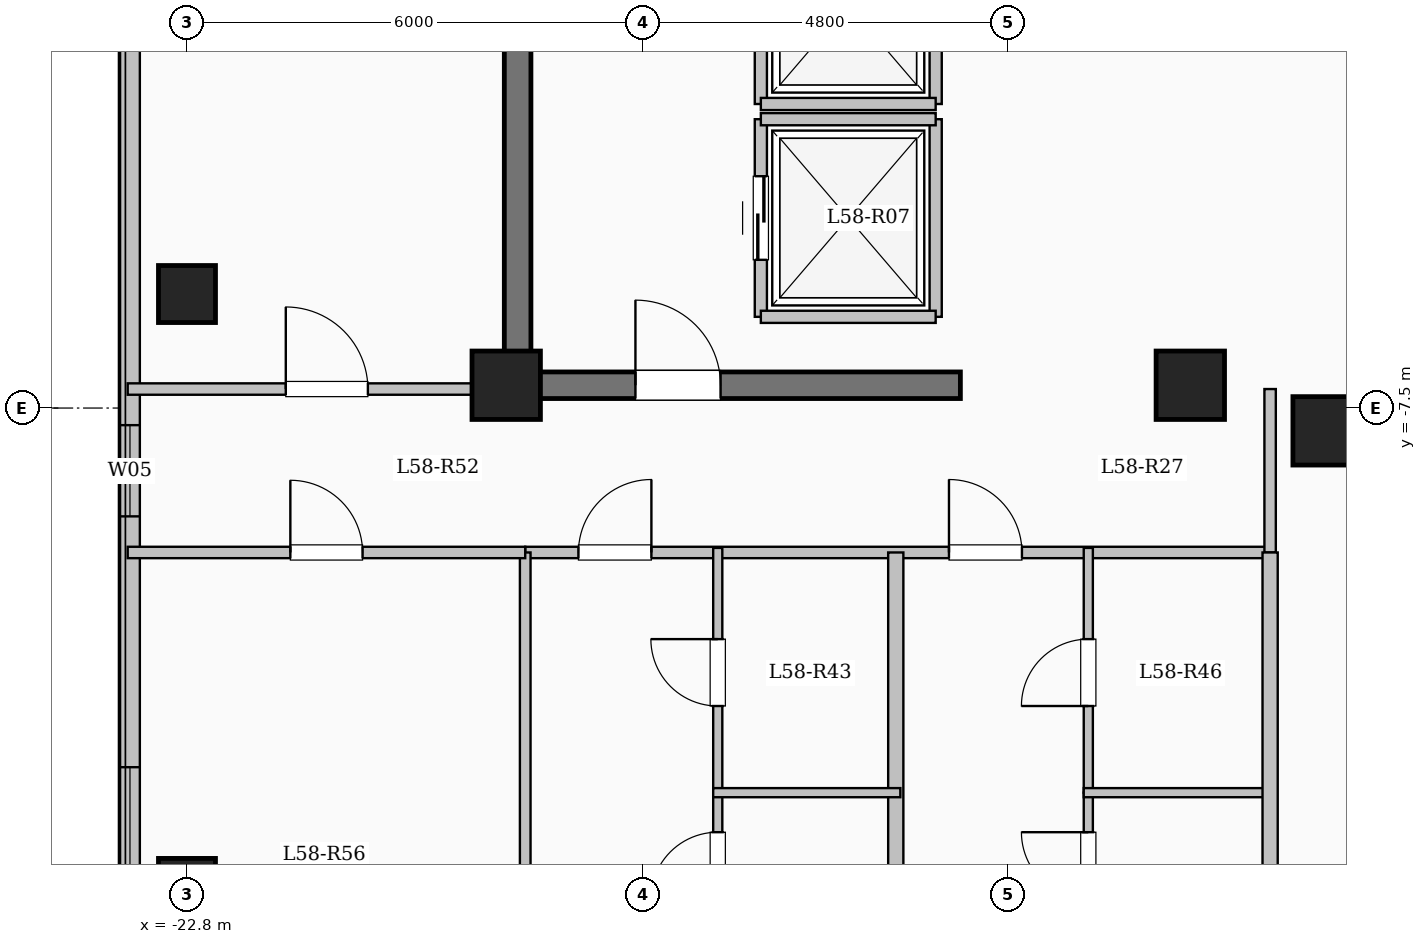
"""IFC4 building model, lengths in metres.
Left out: names, types, materials, properties, quantities, classifications, styles, units other than length and angle.
Written with IfcOpenShell. Run it as: python <this file> out.ifc"""

import sys

from ifc_helpers import new_model, si_unit, direction, frame, frame_2d, origin, origin_2d, place, context, subcontext, project, spatial, rectangle, extrude, element, fill, save


model = new_model("IFC4")
c1 = context("Model", 3, precision=1e-05, world=origin(), true_north=direction((0.0, 1.0)))
c2 = subcontext(c1, "Body", "Model", "MODEL_VIEW")
j1 = project(units=[si_unit("LENGTHUNIT", "METRE"), si_unit("PLANEANGLEUNIT", "RADIAN")], contexts=[c1])
p1 = place(None, origin())
s1 = spatial("IfcSite", under=j1, at=p1, CompositionType="ELEMENT")
p2 = place(p1, origin())
s2 = spatial("IfcBuilding", under=s1, at=p2, CompositionType="ELEMENT")
p3 = place(p2, frame((0.0, 0.0, 213.7)))
s3 = spatial("IfcBuildingStorey", under=s2, at=p3, CompositionType="ELEMENT", Elevation=213.7)
for number, where, z_axis, x_axis in (
    (1, (-7.8, -7.8, 0.0), (0.0, 0.0, 1.0), (1.0, 0.0, 0.0)),
    (2, (-9.6, -7.2, 0.0), (0.0, 0.0, 1.0), (1.0, 0.0, 0.0)),
    (3, (-18.6, -7.2, 0.0), (0.0, 0.0, 1.0), (1.0, 0.0, 0.0)),
):
    element("IfcColumn", number, at=place(p3, frame(where, z_axis=z_axis, x_axis=x_axis)), inside=s3, PredefinedType="COLUMN", context=c2, shape_type="SweptSolid", body=[
        extrude(rectangle(XDim=0.9, YDim=0.9, at=origin_2d()), origin(), (0.0, 0.0, 1.0), 3.35),
    ])
for number, where, z_axis, x_axis in (
    (4, (-22.8, -13.8, 0.0), (0.0, 0.0, 1.0), (1.0, 0.0, 0.0)),
    (5, (-22.8, -6.0, 0.0), (0.0, 0.0, 1.0), (1.0, 0.0, 0.0)),
):
    element("IfcColumn", number, at=place(p3, frame(where, z_axis=z_axis, x_axis=x_axis)), inside=s3, PredefinedType="COLUMN", context=c2, shape_type="SweptSolid", body=[
        extrude(rectangle(XDim=0.75, YDim=0.75, at=origin_2d()), origin(), (0.0, 0.0, 1.0), 3.35),
    ])
p4 = place(p3, frame((-23.55, -17.25, 0.0), z_axis=(0.0, 0.0, 1.0), x_axis=(0.0, 1.0, 0.0)))
e6 = element("IfcWall", 6, at=p4, inside=s3, PredefinedType="SOLIDWALL", context=c2, shape_type="SweptSolid", body=[
    extrude(rectangle(XDim=34.5, YDim=0.26, at=frame_2d((17.25, 0.0))), origin(), (0.0, 0.0, 1.0), 3.1),
])
p5 = place(p4, frame((2.825, 0.0, 0.9)))
e7 = element("IfcOpeningElement", 7, at=p5, cuts=e6, PredefinedType="OPENING", context=c2, shape_type="SweptSolid", body=[
    extrude(rectangle(XDim=2.2, YDim=1.75, at=frame_2d((1.1, 0.875))), frame((0.0, 0.14, 0.0), z_axis=(0.0, -1.0, 0.0), x_axis=(1.0, 0.0, 0.0)), (0.0, 0.0, 1.0), 0.28),
])
p6 = place(p4, frame((8.325, 0.0, 0.95)))
e8 = element("IfcOpeningElement", 8, at=p6, cuts=e6, PredefinedType="OPENING", context=c2, shape_type="SweptSolid", body=[
    extrude(rectangle(XDim=1.2, YDim=1.5, at=frame_2d((0.6, 0.75))), frame((0.0, 0.14, 0.0), z_axis=(0.0, -1.0, 0.0), x_axis=(1.0, 0.0, 0.0)), (0.0, 0.0, 1.0), 0.28),
])
p7 = place(p4, frame((18.0, 0.0, 0.9)))
e9 = element("IfcOpeningElement", 9, at=p7, cuts=e6, PredefinedType="OPENING", context=c2, shape_type="SweptSolid", body=[
    extrude(rectangle(XDim=2.0, YDim=1.7, at=frame_2d((1.0, 0.85))), frame((0.0, 0.14, 0.0), z_axis=(0.0, -1.0, 0.0), x_axis=(1.0, 0.0, 0.0)), (0.0, 0.0, 1.0), 0.28),
])
p8 = place(p4, frame((28.375, 0.0, 0.95)))
e10 = element("IfcOpeningElement", 10, at=p8, cuts=e6, PredefinedType="OPENING", context=c2, shape_type="SweptSolid", body=[
    extrude(rectangle(XDim=1.0, YDim=1.5, at=frame_2d((0.5, 0.75))), frame((0.0, 0.14, 0.0), z_axis=(0.0, -1.0, 0.0), x_axis=(1.0, 0.0, 0.0)), (0.0, 0.0, 1.0), 0.28),
])
p9 = place(p4, frame((31.125, 0.0, 0.9)))
e11 = element("IfcOpeningElement", 11, at=p9, cuts=e6, PredefinedType="OPENING", context=c2, shape_type="SweptSolid", body=[
    extrude(rectangle(XDim=2.0, YDim=1.7, at=frame_2d((1.0, 0.85))), frame((0.0, 0.14, 0.0), z_axis=(0.0, -1.0, 0.0), x_axis=(1.0, 0.0, 0.0)), (0.0, 0.0, 1.0), 0.28),
])
p10 = place(p3, frame((-15.25, -6.3, 0.0), z_axis=(0.0, 0.0, 1.0), x_axis=(0.0, 1.0, 0.0)))
e12 = element("IfcWall", 12, at=p10, inside=s3, PredefinedType="SOLIDWALL", context=c2, shape_type="SweptSolid", body=[
    extrude(rectangle(XDim=2.6, YDim=0.16, at=frame_2d((1.3, 0.0))), origin(), (0.0, 0.0, 1.0), 3.1),
])
p11 = place(p10, frame((0.75, 0.0, 0.0)))
e13 = element("IfcOpeningElement", 13, at=p11, cuts=e12, PredefinedType="OPENING", context=c2, shape_type="SweptSolid", body=[
    extrude(rectangle(XDim=1.1, YDim=2.15, at=frame_2d((0.55, 1.075))), frame((0.0, 0.09, 0.0), z_axis=(0.0, -1.0, 0.0), x_axis=(1.0, 0.0, 0.0)), (0.0, 0.0, 1.0), 0.18),
])
p12 = place(p3, frame((-12.95, -6.3, 0.0), z_axis=(0.0, 0.0, 1.0), x_axis=(0.0, 1.0, 0.0)))
e14 = element("IfcWall", 14, at=p12, inside=s3, PredefinedType="SOLIDWALL", context=c2, shape_type="SweptSolid", body=[
    extrude(rectangle(XDim=2.6, YDim=0.16, at=frame_2d((1.3, 0.0))), origin(), (0.0, 0.0, 1.0), 3.1),
])
for number, where, z_axis, x_axis in (
    (15, (-15.25, -6.3, 0.0), (0.0, 0.0, 1.0), (1.0, 0.0, 0.0)),
    (16, (-15.25, -3.7, 0.0), (0.0, 0.0, 1.0), (1.0, 0.0, 0.0)),
):
    element("IfcWall", number, at=place(p3, frame(where, z_axis=z_axis, x_axis=x_axis)), inside=s3, PredefinedType="SOLIDWALL", context=c2, shape_type="SweptSolid", body=[
        extrude(rectangle(XDim=2.3, YDim=0.16, at=frame_2d((1.15, 0.0))), origin(), (0.0, 0.0, 1.0), 3.1),
    ])
p13 = place(p3, frame((-15.25, -3.5, 0.0), z_axis=(0.0, 0.0, 1.0), x_axis=(0.0, 1.0, 0.0)))
e17 = element("IfcWall", 17, at=p13, inside=s3, PredefinedType="SOLIDWALL", context=c2, shape_type="SweptSolid", body=[
    extrude(rectangle(XDim=2.6, YDim=0.16, at=frame_2d((1.3, 0.0))), origin(), (0.0, 0.0, 1.0), 3.1),
])
p14 = place(p13, frame((0.75, 0.0, 0.0)))
e18 = element("IfcOpeningElement", 18, at=p14, cuts=e17, PredefinedType="OPENING", context=c2, shape_type="SweptSolid", body=[
    extrude(rectangle(XDim=1.1, YDim=2.15, at=frame_2d((0.55, 1.075))), frame((0.0, 0.09, 0.0), z_axis=(0.0, -1.0, 0.0), x_axis=(1.0, 0.0, 0.0)), (0.0, 0.0, 1.0), 0.18),
])
p15 = place(p3, frame((-12.95, -3.5, 0.0), z_axis=(0.0, 0.0, 1.0), x_axis=(0.0, 1.0, 0.0)))
e19 = element("IfcWall", 19, at=p15, inside=s3, PredefinedType="SOLIDWALL", context=c2, shape_type="SweptSolid", body=[
    extrude(rectangle(XDim=2.6, YDim=0.16, at=frame_2d((1.3, 0.0))), origin(), (0.0, 0.0, 1.0), 3.1),
])
p16 = place(p3, frame((-15.25, -3.5, 0.0), z_axis=(0.0, 0.0, 1.0), x_axis=(1.0, 0.0, 0.0)))
e20 = element("IfcWall", 20, at=p16, inside=s3, PredefinedType="SOLIDWALL", context=c2, shape_type="SweptSolid", body=[
    extrude(rectangle(XDim=2.3, YDim=0.16, at=frame_2d((1.15, 0.0))), origin(), (0.0, 0.0, 1.0), 3.1),
])
p17 = place(p3, frame((-18.45, -7.375, 0.0), z_axis=(0.0, 0.0, 1.0), x_axis=(0.0, 1.0, 0.0)))
e21 = element("IfcWall", 21, at=p17, inside=s3, PredefinedType="SHEAR", context=c2, shape_type="SweptSolid", body=[
    extrude(rectangle(XDim=14.05, YDim=0.35, at=frame_2d((7.025, 0.0))), origin(), (0.0, 0.0, 1.0), 3.35),
])
p18 = place(p3, frame((-18.625, -7.2, 0.0), z_axis=(0.0, 0.0, 1.0), x_axis=(1.0, 0.0, 0.0)))
e22 = element("IfcWall", 22, at=p18, inside=s3, PredefinedType="SHEAR", context=c2, shape_type="SweptSolid", body=[
    extrude(rectangle(XDim=6.0, YDim=0.35, at=frame_2d((3.0, 0.0))), origin(), (0.0, 0.0, 1.0), 3.35),
])
p19 = place(p18, frame((1.725, 0.0, 0.0)))
e23 = element("IfcOpeningElement", 23, at=p19, cuts=e22, PredefinedType="OPENING", context=c2, shape_type="SweptSolid", body=[
    extrude(rectangle(XDim=1.12, YDim=2.15, at=frame_2d((0.56, 1.075))), frame((0.0, 0.185, 0.0), z_axis=(0.0, -1.0, 0.0), x_axis=(1.0, 0.0, 0.0)), (0.0, 0.0, 1.0), 0.37),
])
p20 = place(p3, frame((-18.35, -9.4, 0.0), z_axis=(0.0, 0.0, 1.0), x_axis=(1.0, 0.0, 0.0)))
e24 = element("IfcWall", 24, at=p20, inside=s3, PredefinedType="PARTITIONING", context=c2, shape_type="SweptSolid", body=[
    extrude(rectangle(XDim=9.8, YDim=0.15, at=frame_2d((4.9, 0.0))), origin(), (0.0, 0.0, 1.0), 3.1),
])
p21 = place(p20, frame((0.7, 0.0, 0.0)))
e25 = element("IfcOpeningElement", 25, at=p21, cuts=e24, PredefinedType="OPENING", context=c2, shape_type="SweptSolid", body=[
    extrude(rectangle(XDim=0.96, YDim=2.15, at=frame_2d((0.48, 1.075))), frame((0.0, 0.085, 0.0), z_axis=(0.0, -1.0, 0.0), x_axis=(1.0, 0.0, 0.0)), (0.0, 0.0, 1.0), 0.17),
])
p22 = place(p20, frame((5.575, 0.0, 0.0)))
e26 = element("IfcOpeningElement", 26, at=p22, cuts=e24, PredefinedType="OPENING", context=c2, shape_type="SweptSolid", body=[
    extrude(rectangle(XDim=0.96, YDim=2.15, at=frame_2d((0.48, 1.075))), frame((0.0, 0.085, 0.0), z_axis=(0.0, -1.0, 0.0), x_axis=(1.0, 0.0, 0.0)), (0.0, 0.0, 1.0), 0.17),
])
p23 = place(p3, frame((-8.55, -9.4, 0.0), z_axis=(0.0, 0.0, 1.0), x_axis=(0.0, 1.0, 0.0)))
e27 = element("IfcWall", 27, at=p23, inside=s3, PredefinedType="PARTITIONING", context=c2, shape_type="SweptSolid", body=[
    extrude(rectangle(XDim=2.15, YDim=0.15, at=frame_2d((1.075, 0.0))), origin(), (0.0, 0.0, 1.0), 3.1),
])
p24 = place(p3, frame((-13.475, -20.9, 0.0), z_axis=(0.0, 0.0, 1.0), x_axis=(0.0, 1.0, 0.0)))
e28 = element("IfcWall", 28, at=p24, inside=s3, PredefinedType="SOLIDWALL", context=c2, shape_type="SweptSolid", body=[
    extrude(rectangle(XDim=11.5, YDim=0.2, at=frame_2d((5.75, 0.0))), origin(), (0.0, 0.0, 1.0), 3.1),
])
p25 = place(p3, frame((-15.817, -20.9, 0.0), z_axis=(0.0, 0.0, 1.0), x_axis=(0.0, 1.0, 0.0)))
e29 = element("IfcWall", 29, at=p25, inside=s3, PredefinedType="PARTITIONING", context=c2, shape_type="SweptSolid", body=[
    extrude(rectangle(XDim=8.34, YDim=0.12, at=frame_2d((4.17, 0.0))), origin(), (0.0, 0.0, 1.0), 3.1),
])
p26 = place(p25, frame((6.94, 0.0, 0.0)))
e30 = element("IfcOpeningElement", 30, at=p26, cuts=e29, PredefinedType="OPENING", context=c2, shape_type="SweptSolid", body=[
    extrude(rectangle(XDim=0.88, YDim=2.1, at=frame_2d((0.44, 1.05))), frame((0.0, 0.07, 0.0), z_axis=(0.0, -1.0, 0.0), x_axis=(1.0, 0.0, 0.0)), (0.0, 0.0, 1.0), 0.14),
])
p27 = place(p3, frame((-15.817, -12.56, 0.0), z_axis=(0.0, 0.0, 1.0), x_axis=(0.0, 1.0, 0.0)))
e31 = element("IfcWall", 31, at=p27, inside=s3, PredefinedType="PARTITIONING", context=c2, shape_type="SweptSolid", body=[
    extrude(rectangle(XDim=3.22, YDim=0.12, at=frame_2d((1.61, 0.0))), origin(), (0.0, 0.0, 1.0), 3.1),
])
p28 = place(p27, frame((1.14, 0.0, 0.0)))
e32 = element("IfcOpeningElement", 32, at=p28, cuts=e31, PredefinedType="OPENING", context=c2, shape_type="SweptSolid", body=[
    extrude(rectangle(XDim=0.88, YDim=2.1, at=frame_2d((0.44, 1.05))), frame((0.0, 0.07, 0.0), z_axis=(0.0, -1.0, 0.0), x_axis=(1.0, 0.0, 0.0)), (0.0, 0.0, 1.0), 0.14),
])
p29 = place(p3, frame((-15.877, -12.56, 0.0), z_axis=(0.0, 0.0, 1.0), x_axis=(1.0, 0.0, 0.0)))
e33 = element("IfcWall", 33, at=p29, inside=s3, PredefinedType="PARTITIONING", context=c2, shape_type="SweptSolid", body=[
    extrude(rectangle(XDim=2.462, YDim=0.12, at=frame_2d((1.231, 0.0))), origin(), (0.0, 0.0, 1.0), 2.725),
])
p30 = place(p3, frame((-10.942, -20.914, 0.0), z_axis=(0.0, 0.0, 1.0), x_axis=(0.0, 1.0, 0.0)))
e34 = element("IfcWall", 34, at=p30, inside=s3, PredefinedType="PARTITIONING", context=c2, shape_type="SweptSolid", body=[
    extrude(rectangle(XDim=8.354, YDim=0.12, at=frame_2d((4.177, 0.0))), origin(), (0.0, 0.0, 1.0), 3.1),
])
p31 = place(p30, frame((6.954, 0.0, 0.0)))
e35 = element("IfcOpeningElement", 35, at=p31, cuts=e34, PredefinedType="OPENING", context=c2, shape_type="SweptSolid", body=[
    extrude(rectangle(XDim=0.88, YDim=2.1, at=frame_2d((0.44, 1.05))), frame((0.0, 0.07, 0.0), z_axis=(0.0, -1.0, 0.0), x_axis=(1.0, 0.0, 0.0)), (0.0, 0.0, 1.0), 0.14),
])
p32 = place(p3, frame((-10.942, -12.56, 0.0), z_axis=(0.0, 0.0, 1.0), x_axis=(0.0, 1.0, 0.0)))
e36 = element("IfcWall", 36, at=p32, inside=s3, PredefinedType="PARTITIONING", context=c2, shape_type="SweptSolid", body=[
    extrude(rectangle(XDim=3.22, YDim=0.12, at=frame_2d((1.61, 0.0))), origin(), (0.0, 0.0, 1.0), 3.1),
])
p33 = place(p32, frame((1.14, 0.0, 0.0)))
e37 = element("IfcOpeningElement", 37, at=p33, cuts=e36, PredefinedType="OPENING", context=c2, shape_type="SweptSolid", body=[
    extrude(rectangle(XDim=0.88, YDim=2.1, at=frame_2d((0.44, 1.05))), frame((0.0, 0.07, 0.0), z_axis=(0.0, -1.0, 0.0), x_axis=(1.0, 0.0, 0.0)), (0.0, 0.0, 1.0), 0.14),
])
p34 = place(p3, frame((-11.002, -12.56, 0.0), z_axis=(0.0, 0.0, 1.0), x_axis=(1.0, 0.0, 0.0)))
e38 = element("IfcWall", 38, at=p34, inside=s3, PredefinedType="PARTITIONING", context=c2, shape_type="SweptSolid", body=[
    extrude(rectangle(XDim=2.462, YDim=0.12, at=frame_2d((1.231, 0.0))), origin(), (0.0, 0.0, 1.0), 2.725),
])
p35 = place(p3, frame((-8.55, -21.504, 0.0), z_axis=(0.0, 0.0, 1.0), x_axis=(0.0, 1.0, 0.0)))
e39 = element("IfcWall", 39, at=p35, inside=s3, PredefinedType="SOLIDWALL", context=c2, shape_type="SweptSolid", body=[
    extrude(rectangle(XDim=12.104, YDim=0.2, at=frame_2d((6.052, 0.0))), origin(), (0.0, 0.0, 1.0), 3.1),
])
p36 = place(p3, frame((-23.58, -7.25, 0.0), z_axis=(0.0, 0.0, 1.0), x_axis=(1.0, 0.0, 0.0)))
e40 = element("IfcWall", 40, at=p36, inside=s3, PredefinedType="PARTITIONING", context=c2, shape_type="SweptSolid", body=[
    extrude(rectangle(XDim=5.13, YDim=0.15, at=frame_2d((2.565, 0.0))), origin(), (0.0, 0.0, 1.0), 3.1),
])
p37 = place(p36, frame((2.08, 0.0, 0.0)))
e41 = element("IfcOpeningElement", 41, at=p37, cuts=e40, PredefinedType="OPENING", context=c2, shape_type="SweptSolid", body=[
    extrude(rectangle(XDim=1.08, YDim=2.15, at=frame_2d((0.54, 1.075))), frame((0.0, 0.085, 0.0), z_axis=(0.0, -1.0, 0.0), x_axis=(1.0, 0.0, 0.0)), (0.0, 0.0, 1.0), 0.17),
])
p38 = place(p3, frame((-18.35, -17.25, 0.0), z_axis=(0.0, 0.0, 1.0), x_axis=(0.0, 1.0, 0.0)))
e42 = element("IfcWall", 42, at=p38, inside=s3, PredefinedType="PARTITIONING", context=c2, shape_type="SweptSolid", body=[
    extrude(rectangle(XDim=7.85, YDim=0.14, at=frame_2d((3.925, 0.0))), origin(), (0.0, 0.0, 1.0), 3.1),
])
p39 = place(p3, frame((-23.58, -9.4, 0.0), z_axis=(0.0, 0.0, 1.0), x_axis=(1.0, 0.0, 0.0)))
e43 = element("IfcWall", 43, at=p39, inside=s3, PredefinedType="PARTITIONING", context=c2, shape_type="SweptSolid", body=[
    extrude(rectangle(XDim=5.23, YDim=0.15, at=frame_2d((2.615, 0.0))), origin(), (0.0, 0.0, 1.0), 3.1),
])
p40 = place(p39, frame((2.14, 0.0, 0.0)))
e44 = element("IfcOpeningElement", 44, at=p40, cuts=e43, PredefinedType="OPENING", context=c2, shape_type="SweptSolid", body=[
    extrude(rectangle(XDim=0.95, YDim=2.15, at=frame_2d((0.475, 1.075))), frame((0.0, 0.085, 0.0), z_axis=(0.0, -1.0, 0.0), x_axis=(1.0, 0.0, 0.0)), (0.0, 0.0, 1.0), 0.17),
])
p41 = place(p5, origin())
e45 = element("IfcWindow", 45, at=p41, inside=s3, PartitioningType="SINGLE_PANEL", PredefinedType="WINDOW", context=c2, shape_type="SweptSolid", body=[
    extrude(rectangle(XDim=2.2, YDim=1.75, at=frame_2d((1.1, 0.875))), frame((0.0, 0.03, 0.0), z_axis=(0.0, -1.0, 0.0), x_axis=(1.0, 0.0, 0.0)), (0.0, 0.0, 1.0), 0.06),
])
fill(e7, e45)
p42 = place(p6, origin())
e46 = element("IfcWindow", 46, at=p42, inside=s3, PartitioningType="SINGLE_PANEL", PredefinedType="WINDOW", context=c2, shape_type="SweptSolid", body=[
    extrude(rectangle(XDim=1.2, YDim=1.5, at=frame_2d((0.6, 0.75))), frame((0.0, 0.03, 0.0), z_axis=(0.0, -1.0, 0.0), x_axis=(1.0, 0.0, 0.0)), (0.0, 0.0, 1.0), 0.06),
])
fill(e8, e46)
p43 = place(p11, origin())
e47 = element("IfcDoor", 47, at=p43, inside=s3, OperationType="SLIDING_TO_LEFT", PredefinedType="DOOR", context=c2, shape_type="SweptSolid", body=[
    extrude(rectangle(XDim=1.1, YDim=2.15, at=frame_2d((0.55, 1.075))), frame((0.0, 0.025, 0.0), z_axis=(0.0, -1.0, 0.0), x_axis=(1.0, 0.0, 0.0)), (0.0, 0.0, 1.0), 0.05),
])
fill(e13, e47)
p44 = place(p19, origin())
e48 = element("IfcDoor", 48, at=p44, inside=s3, OperationType="SINGLE_SWING_LEFT", PredefinedType="DOOR", context=c2, shape_type="SweptSolid", body=[
    extrude(rectangle(XDim=1.12, YDim=2.15, at=frame_2d((0.56, 1.075))), frame((0.0, 0.025, 0.0), z_axis=(0.0, -1.0, 0.0), x_axis=(1.0, 0.0, 0.0)), (0.0, 0.0, 1.0), 0.05),
])
fill(e23, e48)
p45 = place(p21, origin())
e49 = element("IfcDoor", 49, at=p45, inside=s3, OperationType="SINGLE_SWING_RIGHT", PredefinedType="DOOR", context=c2, shape_type="SweptSolid", body=[
    extrude(rectangle(XDim=0.96, YDim=2.15, at=frame_2d((0.48, 1.075))), frame((0.0, 0.025, 0.0), z_axis=(0.0, -1.0, 0.0), x_axis=(1.0, 0.0, 0.0)), (0.0, 0.0, 1.0), 0.05),
])
fill(e25, e49)
p46 = place(p26, origin())
e50 = element("IfcDoor", 50, at=p46, inside=s3, OperationType="SINGLE_SWING_LEFT", PredefinedType="DOOR", context=c2, shape_type="SweptSolid", body=[
    extrude(rectangle(XDim=0.88, YDim=2.1, at=frame_2d((0.44, 1.05))), frame((0.0, 0.025, 0.0), z_axis=(0.0, -1.0, 0.0), x_axis=(1.0, 0.0, 0.0)), (0.0, 0.0, 1.0), 0.05),
])
fill(e30, e50)
p47 = place(p28, origin())
e51 = element("IfcDoor", 51, at=p47, inside=s3, OperationType="SINGLE_SWING_RIGHT", PredefinedType="DOOR", context=c2, shape_type="SweptSolid", body=[
    extrude(rectangle(XDim=0.88, YDim=2.1, at=frame_2d((0.44, 1.05))), frame((0.0, 0.025, 0.0), z_axis=(0.0, -1.0, 0.0), x_axis=(1.0, 0.0, 0.0)), (0.0, 0.0, 1.0), 0.05),
])
fill(e32, e51)
p48 = place(p22, origin())
e52 = element("IfcDoor", 52, at=p48, inside=s3, OperationType="SINGLE_SWING_LEFT", PredefinedType="DOOR", context=c2, shape_type="SweptSolid", body=[
    extrude(rectangle(XDim=0.96, YDim=2.15, at=frame_2d((0.48, 1.075))), frame((0.0, 0.025, 0.0), z_axis=(0.0, -1.0, 0.0), x_axis=(1.0, 0.0, 0.0)), (0.0, 0.0, 1.0), 0.05),
])
fill(e26, e52)
p49 = place(p31, origin())
e53 = element("IfcDoor", 53, at=p49, inside=s3, OperationType="SINGLE_SWING_RIGHT", PredefinedType="DOOR", context=c2, shape_type="SweptSolid", body=[
    extrude(rectangle(XDim=0.88, YDim=2.1, at=frame_2d((0.44, 1.05))), frame((0.0, 0.025, 0.0), z_axis=(0.0, -1.0, 0.0), x_axis=(1.0, 0.0, 0.0)), (0.0, 0.0, 1.0), 0.05),
])
fill(e35, e53)
p50 = place(p33, origin())
e54 = element("IfcDoor", 54, at=p50, inside=s3, OperationType="SINGLE_SWING_LEFT", PredefinedType="DOOR", context=c2, shape_type="SweptSolid", body=[
    extrude(rectangle(XDim=0.88, YDim=2.1, at=frame_2d((0.44, 1.05))), frame((0.0, 0.025, 0.0), z_axis=(0.0, -1.0, 0.0), x_axis=(1.0, 0.0, 0.0)), (0.0, 0.0, 1.0), 0.05),
])
fill(e37, e54)
p51 = place(p40, origin())
e55 = element("IfcDoor", 55, at=p51, inside=s3, OperationType="SINGLE_SWING_LEFT", PredefinedType="DOOR", context=c2, shape_type="SweptSolid", body=[
    extrude(rectangle(XDim=0.95, YDim=2.15, at=frame_2d((0.475, 1.075))), frame((0.0, 0.025, 0.0), z_axis=(0.0, -1.0, 0.0), x_axis=(1.0, 0.0, 0.0)), (0.0, 0.0, 1.0), 0.05),
])
fill(e44, e55)
p52 = place(p37, origin())
e56 = element("IfcDoor", 56, at=p52, inside=s3, OperationType="SINGLE_SWING_LEFT", PredefinedType="DOOR", context=c2, shape_type="SweptSolid", body=[
    extrude(rectangle(XDim=1.08, YDim=2.15, at=frame_2d((0.54, 1.075))), frame((0.0, 0.025, 0.0), z_axis=(0.0, -1.0, 0.0), x_axis=(1.0, 0.0, 0.0)), (0.0, 0.0, 1.0), 0.05),
])
fill(e41, e56)
save(model, sys.argv[1])
